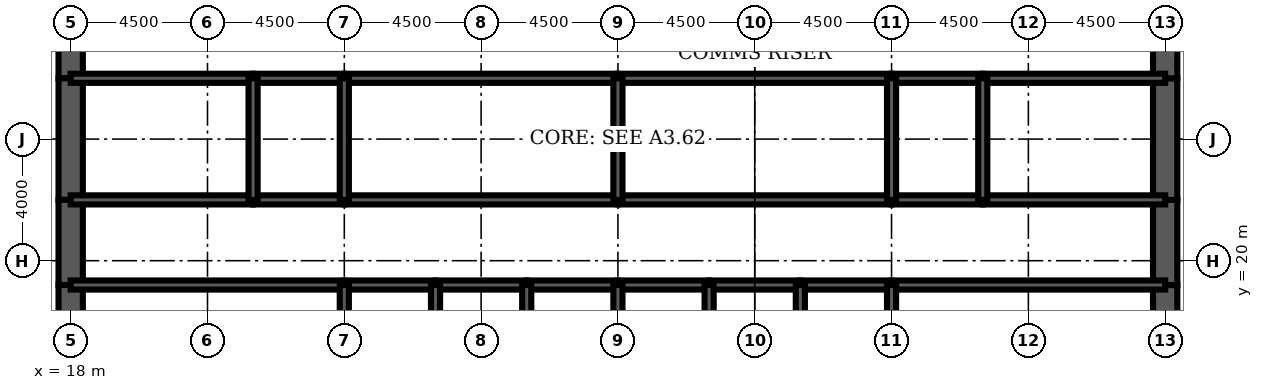
"""IFC4 building model, lengths in metres.
Left out: names, types, materials, properties, quantities, classifications, styles, units other than length and angle.
Written with IfcOpenShell. Run it as: python <this file> out.ifc"""

import sys

from ifc_helpers import new_model, si_unit, direction, frame, frame_2d, origin, place, context, subcontext, project, spatial, rectangle, extrude, element, fill, save


model = new_model("IFC4")
c1 = context("Model", 3, precision=1e-05, world=origin(), true_north=direction((0.0, 1.0)))
c2 = subcontext(c1, "Body", "Model", "MODEL_VIEW")
j1 = project(units=[si_unit("LENGTHUNIT", "METRE"), si_unit("PLANEANGLEUNIT", "RADIAN")], contexts=[c1])
p1 = place(None, origin())
s1 = spatial("IfcSite", under=j1, at=p1, CompositionType="ELEMENT")
p2 = place(p1, origin())
s2 = spatial("IfcBuilding", under=s1, at=p2, CompositionType="ELEMENT")
p3 = place(p2, frame((0.0, 0.0, 265.6)))
s3 = spatial("IfcBuildingStorey", under=s2, at=p3, CompositionType="ELEMENT", Elevation=265.6)
p4 = place(p3, frame((18.0, 28.8, 0.0), z_axis=(0.0, 0.0, 1.0), x_axis=(0.0, -1.0, 0.0)))
e1 = element("IfcWall", 1, at=p4, inside=s3, PredefinedType="SHEAR", context=c2, shape_type="SweptSolid", body=[
    extrude(rectangle(XDim=2.8, YDim=0.8, at=frame_2d((1.4, 0.0))), origin(), (0.0, 0.0, 1.0), 5.5),
])
p5 = place(p4, frame((0.4, 0.0, 0.0)))
e2 = element("IfcOpeningElement", 2, at=p5, cuts=e1, PredefinedType="OPENING", context=c2, shape_type="SweptSolid", body=[
    extrude(rectangle(XDim=1.8, YDim=2.1, at=frame_2d((0.9, 1.05))), frame((0.0, 0.41, 0.0), z_axis=(0.0, -1.0, 0.0), x_axis=(1.0, 0.0, 0.0)), (0.0, 0.0, 1.0), 0.82),
])
p6 = place(p3, frame((18.0, 26.0, 0.0), z_axis=(0.0, 0.0, 1.0), x_axis=(0.0, -1.0, 0.0)))
e3 = element("IfcWall", 3, at=p6, inside=s3, PredefinedType="SHEAR", context=c2, shape_type="SweptSolid", body=[
    extrude(rectangle(XDim=4.0, YDim=0.8, at=frame_2d((2.0, 0.0))), origin(), (0.0, 0.0, 1.0), 5.5),
])
p7 = place(p3, frame((18.0, 22.0, 0.0), z_axis=(0.0, 0.0, 1.0), x_axis=(0.0, -1.0, 0.0)))
e4 = element("IfcWall", 4, at=p7, inside=s3, PredefinedType="SHEAR", context=c2, shape_type="SweptSolid", body=[
    extrude(rectangle(XDim=2.8, YDim=0.8, at=frame_2d((1.4, 0.0))), origin(), (0.0, 0.0, 1.0), 5.5),
])
p8 = place(p7, frame((0.6, 0.0, 0.0)))
e5 = element("IfcOpeningElement", 5, at=p8, cuts=e4, PredefinedType="OPENING", context=c2, shape_type="SweptSolid", body=[
    extrude(rectangle(XDim=1.8, YDim=2.1, at=frame_2d((0.9, 1.05))), frame((0.0, 0.41, 0.0), z_axis=(0.0, -1.0, 0.0), x_axis=(1.0, 0.0, 0.0)), (0.0, 0.0, 1.0), 0.82),
])
for number, where, z_axis, x_axis in (
    (6, (18.0, 19.2, 0.0), (0.0, 0.0, 1.0), (0.0, -1.0, 0.0)),
    (7, (54.0, 16.0, 0.0), (0.0, 0.0, 1.0), (0.0, 1.0, 0.0)),
):
    element("IfcWall", number, at=place(p3, frame(where, z_axis=z_axis, x_axis=x_axis)), inside=s3, PredefinedType="SHEAR", context=c2, shape_type="SweptSolid", body=[
        extrude(rectangle(XDim=3.2, YDim=0.8, at=frame_2d((1.6, 0.0))), origin(), (0.0, 0.0, 1.0), 5.5),
    ])
p9 = place(p3, frame((54.0, 19.2, 0.0), z_axis=(0.0, 0.0, 1.0), x_axis=(0.0, 1.0, 0.0)))
e8 = element("IfcWall", 8, at=p9, inside=s3, PredefinedType="SHEAR", context=c2, shape_type="SweptSolid", body=[
    extrude(rectangle(XDim=2.8, YDim=0.8, at=frame_2d((1.4, 0.0))), origin(), (0.0, 0.0, 1.0), 5.5),
])
p10 = place(p9, frame((0.4, 0.0, 0.0)))
e9 = element("IfcOpeningElement", 9, at=p10, cuts=e8, PredefinedType="OPENING", context=c2, shape_type="SweptSolid", body=[
    extrude(rectangle(XDim=1.8, YDim=2.1, at=frame_2d((0.9, 1.05))), frame((0.0, 0.41, 0.0), z_axis=(0.0, -1.0, 0.0), x_axis=(1.0, 0.0, 0.0)), (0.0, 0.0, 1.0), 0.82),
])
p11 = place(p3, frame((54.0, 22.0, 0.0), z_axis=(0.0, 0.0, 1.0), x_axis=(0.0, 1.0, 0.0)))
e10 = element("IfcWall", 10, at=p11, inside=s3, PredefinedType="SHEAR", context=c2, shape_type="SweptSolid", body=[
    extrude(rectangle(XDim=4.0, YDim=0.8, at=frame_2d((2.0, 0.0))), origin(), (0.0, 0.0, 1.0), 5.5),
])
p12 = place(p3, frame((54.0, 26.0, 0.0), z_axis=(0.0, 0.0, 1.0), x_axis=(0.0, 1.0, 0.0)))
e11 = element("IfcWall", 11, at=p12, inside=s3, PredefinedType="SHEAR", context=c2, shape_type="SweptSolid", body=[
    extrude(rectangle(XDim=2.8, YDim=0.8, at=frame_2d((1.4, 0.0))), origin(), (0.0, 0.0, 1.0), 5.5),
])
p13 = place(p12, frame((0.6, 0.0, 0.0)))
e12 = element("IfcOpeningElement", 12, at=p13, cuts=e11, PredefinedType="OPENING", context=c2, shape_type="SweptSolid", body=[
    extrude(rectangle(XDim=1.8, YDim=2.1, at=frame_2d((0.9, 1.05))), frame((0.0, 0.41, 0.0), z_axis=(0.0, -1.0, 0.0), x_axis=(1.0, 0.0, 0.0)), (0.0, 0.0, 1.0), 0.82),
])
p14 = place(p3, frame((18.0, 19.2, 0.0), z_axis=(0.0, 0.0, 1.0), x_axis=(1.0, 0.0, 0.0)))
e13 = element("IfcWall", 13, at=p14, inside=s3, PredefinedType="SOLIDWALL", context=c2, shape_type="SweptSolid", body=[
    extrude(rectangle(XDim=9.0, YDim=0.3, at=frame_2d((4.5, 0.0))), origin(), (0.0, 0.0, 1.0), 5.5),
])
p15 = place(p14, frame((0.65, 0.0, 0.0)))
e14 = element("IfcOpeningElement", 14, at=p15, cuts=e13, PredefinedType="OPENING", context=c2, shape_type="SweptSolid", body=[
    extrude(rectangle(XDim=1.0, YDim=2.1, at=frame_2d((0.5, 1.05))), frame((0.0, 0.16, 0.0), z_axis=(0.0, -1.0, 0.0), x_axis=(1.0, 0.0, 0.0)), (0.0, 0.0, 1.0), 0.32),
])
p16 = place(p3, frame((27.0, 19.2, 0.0), z_axis=(0.0, 0.0, 1.0), x_axis=(1.0, 0.0, 0.0)))
e15 = element("IfcWall", 15, at=p16, inside=s3, PredefinedType="SOLIDWALL", context=c2, shape_type="SweptSolid", body=[
    extrude(rectangle(XDim=3.0, YDim=0.3, at=frame_2d((1.5, 0.0))), origin(), (0.0, 0.0, 1.0), 5.5),
])
p17 = place(p16, frame((0.95, 0.0, 0.0)))
e16 = element("IfcOpeningElement", 16, at=p17, cuts=e15, PredefinedType="OPENING", context=c2, shape_type="SweptSolid", body=[
    extrude(rectangle(XDim=1.1, YDim=2.2, at=frame_2d((0.55, 1.1))), frame((0.0, 0.16, 0.0), z_axis=(0.0, -1.0, 0.0), x_axis=(1.0, 0.0, 0.0)), (0.0, 0.0, 1.0), 0.32),
])
for number, where, z_axis, x_axis in (
    (17, (30.0, 19.2, 0.0), (0.0, 0.0, 1.0), (1.0, 0.0, 0.0)),
    (18, (33.0, 19.2, 0.0), (0.0, 0.0, 1.0), (1.0, 0.0, 0.0)),
    (19, (36.0, 19.2, 0.0), (0.0, 0.0, 1.0), (1.0, 0.0, 0.0)),
):
    element("IfcWall", number, at=place(p3, frame(where, z_axis=z_axis, x_axis=x_axis)), inside=s3, PredefinedType="SOLIDWALL", context=c2, shape_type="SweptSolid", body=[
        extrude(rectangle(XDim=3.0, YDim=0.3, at=frame_2d((1.5, 0.0))), origin(), (0.0, 0.0, 1.0), 5.5),
    ])
p18 = place(p3, frame((39.0, 19.2, 0.0), z_axis=(0.0, 0.0, 1.0), x_axis=(1.0, 0.0, 0.0)))
e20 = element("IfcWall", 20, at=p18, inside=s3, PredefinedType="SOLIDWALL", context=c2, shape_type="SweptSolid", body=[
    extrude(rectangle(XDim=3.0, YDim=0.3, at=frame_2d((1.5, 0.0))), origin(), (0.0, 0.0, 1.0), 5.5),
])
p19 = place(p18, frame((1.0, 0.0, 0.0)))
e21 = element("IfcOpeningElement", 21, at=p19, cuts=e20, PredefinedType="OPENING", context=c2, shape_type="SweptSolid", body=[
    extrude(rectangle(XDim=1.0, YDim=2.1, at=frame_2d((0.5, 1.05))), frame((0.0, 0.16, 0.0), z_axis=(0.0, -1.0, 0.0), x_axis=(1.0, 0.0, 0.0)), (0.0, 0.0, 1.0), 0.32),
])
p20 = place(p3, frame((42.0, 19.2, 0.0), z_axis=(0.0, 0.0, 1.0), x_axis=(1.0, 0.0, 0.0)))
e22 = element("IfcWall", 22, at=p20, inside=s3, PredefinedType="SOLIDWALL", context=c2, shape_type="SweptSolid", body=[
    extrude(rectangle(XDim=3.0, YDim=0.3, at=frame_2d((1.5, 0.0))), origin(), (0.0, 0.0, 1.0), 5.5),
])
p21 = place(p20, frame((1.0, 0.0, 0.0)))
e23 = element("IfcOpeningElement", 23, at=p21, cuts=e22, PredefinedType="OPENING", context=c2, shape_type="SweptSolid", body=[
    extrude(rectangle(XDim=1.0, YDim=2.1, at=frame_2d((0.5, 1.05))), frame((0.0, 0.16, 0.0), z_axis=(0.0, -1.0, 0.0), x_axis=(1.0, 0.0, 0.0)), (0.0, 0.0, 1.0), 0.32),
])
p22 = place(p3, frame((45.0, 19.2, 0.0), z_axis=(0.0, 0.0, 1.0), x_axis=(1.0, 0.0, 0.0)))
e24 = element("IfcWall", 24, at=p22, inside=s3, PredefinedType="SOLIDWALL", context=c2, shape_type="SweptSolid", body=[
    extrude(rectangle(XDim=9.0, YDim=0.3, at=frame_2d((4.5, 0.0))), origin(), (0.0, 0.0, 1.0), 5.5),
])
p23 = place(p22, frame((7.35, 0.0, 0.0)))
e25 = element("IfcOpeningElement", 25, at=p23, cuts=e24, PredefinedType="OPENING", context=c2, shape_type="SweptSolid", body=[
    extrude(rectangle(XDim=1.0, YDim=2.1, at=frame_2d((0.5, 1.05))), frame((0.0, 0.16, 0.0), z_axis=(0.0, -1.0, 0.0), x_axis=(1.0, 0.0, 0.0)), (0.0, 0.0, 1.0), 0.32),
])
p24 = place(p3, frame((18.0, 22.0, 0.0), z_axis=(0.0, 0.0, 1.0), x_axis=(1.0, 0.0, 0.0)))
e26 = element("IfcWall", 26, at=p24, inside=s3, PredefinedType="SOLIDWALL", context=c2, shape_type="SweptSolid", body=[
    extrude(rectangle(XDim=6.0, YDim=0.3, at=frame_2d((3.0, 0.0))), origin(), (0.0, 0.0, 1.0), 5.5),
])
p25 = place(p24, frame((2.0, 0.0, 0.0)))
e27 = element("IfcOpeningElement", 27, at=p25, cuts=e26, PredefinedType="OPENING", context=c2, shape_type="SweptSolid", body=[
    extrude(rectangle(XDim=1.0, YDim=2.1, at=frame_2d((0.5, 1.05))), frame((0.0, 0.16, 0.0), z_axis=(0.0, -1.0, 0.0), x_axis=(1.0, 0.0, 0.0)), (0.0, 0.0, 1.0), 0.32),
])
p26 = place(p3, frame((24.0, 22.0, 0.0), z_axis=(0.0, 0.0, 1.0), x_axis=(1.0, 0.0, 0.0)))
e28 = element("IfcWall", 28, at=p26, inside=s3, PredefinedType="SOLIDWALL", context=c2, shape_type="SweptSolid", body=[
    extrude(rectangle(XDim=3.0, YDim=0.3, at=frame_2d((1.5, 0.0))), origin(), (0.0, 0.0, 1.0), 5.5),
])
p27 = place(p26, frame((1.0, 0.0, 0.0)))
e29 = element("IfcOpeningElement", 29, at=p27, cuts=e28, PredefinedType="OPENING", context=c2, shape_type="SweptSolid", body=[
    extrude(rectangle(XDim=1.0, YDim=2.1, at=frame_2d((0.5, 1.05))), frame((0.0, 0.16, 0.0), z_axis=(0.0, -1.0, 0.0), x_axis=(1.0, 0.0, 0.0)), (0.0, 0.0, 1.0), 0.32),
])
p28 = place(p3, frame((27.0, 22.0, 0.0), z_axis=(0.0, 0.0, 1.0), x_axis=(1.0, 0.0, 0.0)))
e30 = element("IfcWall", 30, at=p28, inside=s3, PredefinedType="SOLIDWALL", context=c2, shape_type="SweptSolid", body=[
    extrude(rectangle(XDim=9.0, YDim=0.3, at=frame_2d((4.5, 0.0))), origin(), (0.0, 0.0, 1.0), 5.5),
])
p29 = place(p28, frame((4.0, 0.0, 0.0)))
e31 = element("IfcOpeningElement", 31, at=p29, cuts=e30, PredefinedType="OPENING", context=c2, shape_type="SweptSolid", body=[
    extrude(rectangle(XDim=1.0, YDim=2.1, at=frame_2d((0.5, 1.05))), frame((0.0, 0.16, 0.0), z_axis=(0.0, -1.0, 0.0), x_axis=(1.0, 0.0, 0.0)), (0.0, 0.0, 1.0), 0.32),
])
p30 = place(p3, frame((36.0, 22.0, 0.0), z_axis=(0.0, 0.0, 1.0), x_axis=(1.0, 0.0, 0.0)))
e32 = element("IfcWall", 32, at=p30, inside=s3, PredefinedType="SOLIDWALL", context=c2, shape_type="SweptSolid", body=[
    extrude(rectangle(XDim=9.0, YDim=0.3, at=frame_2d((4.5, 0.0))), origin(), (0.0, 0.0, 1.0), 5.5),
])
p31 = place(p30, frame((4.0, 0.0, 0.0)))
e33 = element("IfcOpeningElement", 33, at=p31, cuts=e32, PredefinedType="OPENING", context=c2, shape_type="SweptSolid", body=[
    extrude(rectangle(XDim=1.0, YDim=2.1, at=frame_2d((0.5, 1.05))), frame((0.0, 0.16, 0.0), z_axis=(0.0, -1.0, 0.0), x_axis=(1.0, 0.0, 0.0)), (0.0, 0.0, 1.0), 0.32),
])
p32 = place(p3, frame((45.0, 22.0, 0.0), z_axis=(0.0, 0.0, 1.0), x_axis=(1.0, 0.0, 0.0)))
e34 = element("IfcWall", 34, at=p32, inside=s3, PredefinedType="SOLIDWALL", context=c2, shape_type="SweptSolid", body=[
    extrude(rectangle(XDim=3.0, YDim=0.3, at=frame_2d((1.5, 0.0))), origin(), (0.0, 0.0, 1.0), 5.5),
])
p33 = place(p32, frame((1.0, 0.0, 0.0)))
e35 = element("IfcOpeningElement", 35, at=p33, cuts=e34, PredefinedType="OPENING", context=c2, shape_type="SweptSolid", body=[
    extrude(rectangle(XDim=1.0, YDim=2.1, at=frame_2d((0.5, 1.05))), frame((0.0, 0.16, 0.0), z_axis=(0.0, -1.0, 0.0), x_axis=(1.0, 0.0, 0.0)), (0.0, 0.0, 1.0), 0.32),
])
p34 = place(p3, frame((48.0, 22.0, 0.0), z_axis=(0.0, 0.0, 1.0), x_axis=(1.0, 0.0, 0.0)))
e36 = element("IfcWall", 36, at=p34, inside=s3, PredefinedType="SOLIDWALL", context=c2, shape_type="SweptSolid", body=[
    extrude(rectangle(XDim=6.0, YDim=0.3, at=frame_2d((3.0, 0.0))), origin(), (0.0, 0.0, 1.0), 5.5),
])
p35 = place(p34, frame((2.0, 0.0, 0.0)))
e37 = element("IfcOpeningElement", 37, at=p35, cuts=e36, PredefinedType="OPENING", context=c2, shape_type="SweptSolid", body=[
    extrude(rectangle(XDim=1.0, YDim=2.1, at=frame_2d((0.5, 1.05))), frame((0.0, 0.16, 0.0), z_axis=(0.0, -1.0, 0.0), x_axis=(1.0, 0.0, 0.0)), (0.0, 0.0, 1.0), 0.32),
])
p36 = place(p3, frame((18.0, 26.0, 0.0), z_axis=(0.0, 0.0, 1.0), x_axis=(1.0, 0.0, 0.0)))
e38 = element("IfcWall", 38, at=p36, inside=s3, PredefinedType="SOLIDWALL", context=c2, shape_type="SweptSolid", body=[
    extrude(rectangle(XDim=6.0, YDim=0.3, at=frame_2d((3.0, 0.0))), origin(), (0.0, 0.0, 1.0), 5.5),
])
p37 = place(p3, frame((24.0, 26.0, 0.0), z_axis=(0.0, 0.0, 1.0), x_axis=(1.0, 0.0, 0.0)))
e39 = element("IfcWall", 39, at=p37, inside=s3, PredefinedType="SOLIDWALL", context=c2, shape_type="SweptSolid", body=[
    extrude(rectangle(XDim=3.0, YDim=0.3, at=frame_2d((1.5, 0.0))), origin(), (0.0, 0.0, 1.0), 5.5),
])
for number, where, z_axis, x_axis in (
    (40, (27.0, 26.0, 0.0), (0.0, 0.0, 1.0), (1.0, 0.0, 0.0)),
    (41, (36.0, 26.0, 0.0), (0.0, 0.0, 1.0), (1.0, 0.0, 0.0)),
):
    element("IfcWall", number, at=place(p3, frame(where, z_axis=z_axis, x_axis=x_axis)), inside=s3, PredefinedType="SOLIDWALL", context=c2, shape_type="SweptSolid", body=[
        extrude(rectangle(XDim=9.0, YDim=0.3, at=frame_2d((4.5, 0.0))), origin(), (0.0, 0.0, 1.0), 5.5),
    ])
p38 = place(p3, frame((45.0, 26.0, 0.0), z_axis=(0.0, 0.0, 1.0), x_axis=(1.0, 0.0, 0.0)))
e42 = element("IfcWall", 42, at=p38, inside=s3, PredefinedType="SOLIDWALL", context=c2, shape_type="SweptSolid", body=[
    extrude(rectangle(XDim=3.0, YDim=0.3, at=frame_2d((1.5, 0.0))), origin(), (0.0, 0.0, 1.0), 5.5),
])
p39 = place(p3, frame((48.0, 26.0, 0.0), z_axis=(0.0, 0.0, 1.0), x_axis=(1.0, 0.0, 0.0)))
e43 = element("IfcWall", 43, at=p39, inside=s3, PredefinedType="SOLIDWALL", context=c2, shape_type="SweptSolid", body=[
    extrude(rectangle(XDim=6.0, YDim=0.3, at=frame_2d((3.0, 0.0))), origin(), (0.0, 0.0, 1.0), 5.5),
])
for number, where, z_axis, x_axis in (
    (44, (27.0, 16.0, 0.0), (0.0, 0.0, 1.0), (0.0, 1.0, 0.0)),
    (45, (30.0, 16.0, 0.0), (0.0, 0.0, 1.0), (0.0, 1.0, 0.0)),
    (46, (33.0, 16.0, 0.0), (0.0, 0.0, 1.0), (0.0, 1.0, 0.0)),
    (47, (36.0, 16.0, 0.0), (0.0, 0.0, 1.0), (0.0, 1.0, 0.0)),
    (48, (39.0, 16.0, 0.0), (0.0, 0.0, 1.0), (0.0, 1.0, 0.0)),
    (49, (42.0, 16.0, 0.0), (0.0, 0.0, 1.0), (0.0, 1.0, 0.0)),
    (50, (45.0, 16.0, 0.0), (0.0, 0.0, 1.0), (0.0, 1.0, 0.0)),
):
    element("IfcWall", number, at=place(p3, frame(where, z_axis=z_axis, x_axis=x_axis)), inside=s3, PredefinedType="SOLIDWALL", context=c2, shape_type="SweptSolid", body=[
        extrude(rectangle(XDim=3.2, YDim=0.3, at=frame_2d((1.6, 0.0))), origin(), (0.0, 0.0, 1.0), 5.5),
    ])
for number, where, z_axis, x_axis in (
    (51, (24.0, 22.0, 0.0), (0.0, 0.0, 1.0), (0.0, 1.0, 0.0)),
    (52, (27.0, 22.0, 0.0), (0.0, 0.0, 1.0), (0.0, 1.0, 0.0)),
    (53, (36.0, 22.0, 0.0), (0.0, 0.0, 1.0), (0.0, 1.0, 0.0)),
    (54, (45.0, 22.0, 0.0), (0.0, 0.0, 1.0), (0.0, 1.0, 0.0)),
    (55, (48.0, 22.0, 0.0), (0.0, 0.0, 1.0), (0.0, 1.0, 0.0)),
):
    element("IfcWall", number, at=place(p3, frame(where, z_axis=z_axis, x_axis=x_axis)), inside=s3, PredefinedType="SOLIDWALL", context=c2, shape_type="SweptSolid", body=[
        extrude(rectangle(XDim=4.0, YDim=0.3, at=frame_2d((2.0, 0.0))), origin(), (0.0, 0.0, 1.0), 5.5),
    ])
p40 = place(p3, frame((39.0, 22.15, 0.0), z_axis=(0.0, 0.0, 1.0), x_axis=(0.0, 1.0, 0.0)))
e56 = element("IfcWall", 56, at=p40, inside=s3, PredefinedType="PARTITIONING", context=c2, shape_type="SweptSolid", body=[
    extrude(rectangle(XDim=3.7, YDim=0.15, at=frame_2d((1.85, 0.0))), origin(), (0.0, 0.0, 1.0), 3.0),
])
p41 = place(p40, frame((2.2, 0.0, 0.0)))
e57 = element("IfcOpeningElement", 57, at=p41, cuts=e56, PredefinedType="OPENING", context=c2, shape_type="SweptSolid", body=[
    extrude(rectangle(XDim=1.0, YDim=2.1, at=frame_2d((0.5, 1.05))), frame((0.0, 0.085, 0.0), z_axis=(0.0, -1.0, 0.0), x_axis=(1.0, 0.0, 0.0)), (0.0, 0.0, 1.0), 0.17),
])
p42 = place(p41, origin())
e58 = element("IfcDoor", 58, at=p42, inside=s3, OperationType="SINGLE_SWING_RIGHT", PredefinedType="DOOR", context=c2, shape_type="SweptSolid", body=[
    extrude(rectangle(XDim=1.0, YDim=2.1, at=frame_2d((0.5, 1.05))), frame((0.0, 0.025, 0.0), z_axis=(0.0, -1.0, 0.0), x_axis=(1.0, 0.0, 0.0)), (0.0, 0.0, 1.0), 0.05),
])
fill(e57, e58)
p43 = place(p17, origin())
e59 = element("IfcDoor", 59, at=p43, inside=s3, OperationType="DOUBLE_DOOR_SLIDING", PredefinedType="USERDEFINED", context=c2, shape_type="SweptSolid", body=[
    extrude(rectangle(XDim=1.1, YDim=2.2, at=frame_2d((0.55, 1.1))), frame((0.0, 0.025, 0.0), z_axis=(0.0, -1.0, 0.0), x_axis=(1.0, 0.0, 0.0)), (0.0, 0.0, 1.0), 0.05),
])
fill(e16, e59)
p44 = place(p15, origin())
e60 = element("IfcDoor", 60, at=p44, inside=s3, OperationType="SINGLE_SWING_LEFT", PredefinedType="DOOR", context=c2, shape_type="SweptSolid", body=[
    extrude(rectangle(XDim=1.0, YDim=2.1, at=frame_2d((0.5, 1.05))), frame((0.0, 0.025, 0.0), z_axis=(0.0, -1.0, 0.0), x_axis=(1.0, 0.0, 0.0)), (0.0, 0.0, 1.0), 0.05),
])
fill(e14, e60)
p45 = place(p23, origin())
e61 = element("IfcDoor", 61, at=p45, inside=s3, OperationType="SINGLE_SWING_RIGHT", PredefinedType="DOOR", context=c2, shape_type="SweptSolid", body=[
    extrude(rectangle(XDim=1.0, YDim=2.1, at=frame_2d((0.5, 1.05))), frame((0.0, 0.025, 0.0), z_axis=(0.0, -1.0, 0.0), x_axis=(1.0, 0.0, 0.0)), (0.0, 0.0, 1.0), 0.05),
])
fill(e25, e61)
p46 = place(p8, origin())
e62 = element("IfcDoor", 62, at=p46, inside=s3, OperationType="SINGLE_SWING_LEFT", PredefinedType="DOOR", context=c2, shape_type="SweptSolid", body=[
    extrude(rectangle(XDim=1.8, YDim=2.1, at=frame_2d((0.9, 1.05))), frame((0.0, 0.4, 0.0), z_axis=(0.0, -1.0, 0.0), x_axis=(1.0, 0.0, 0.0)), (0.0, 0.0, 1.0), 0.8),
])
fill(e5, e62)
p47 = place(p5, origin())
e63 = element("IfcDoor", 63, at=p47, inside=s3, OperationType="SINGLE_SWING_LEFT", PredefinedType="DOOR", context=c2, shape_type="SweptSolid", body=[
    extrude(rectangle(XDim=1.8, YDim=2.1, at=frame_2d((0.9, 1.05))), frame((0.0, 0.4, 0.0), z_axis=(0.0, -1.0, 0.0), x_axis=(1.0, 0.0, 0.0)), (0.0, 0.0, 1.0), 0.8),
])
fill(e2, e63)
p48 = place(p10, origin())
e64 = element("IfcDoor", 64, at=p48, inside=s3, OperationType="SINGLE_SWING_LEFT", PredefinedType="DOOR", context=c2, shape_type="SweptSolid", body=[
    extrude(rectangle(XDim=1.8, YDim=2.1, at=frame_2d((0.9, 1.05))), frame((0.0, 0.4, 0.0), z_axis=(0.0, -1.0, 0.0), x_axis=(1.0, 0.0, 0.0)), (0.0, 0.0, 1.0), 0.8),
])
fill(e9, e64)
p49 = place(p13, origin())
e65 = element("IfcDoor", 65, at=p49, inside=s3, OperationType="SINGLE_SWING_LEFT", PredefinedType="DOOR", context=c2, shape_type="SweptSolid", body=[
    extrude(rectangle(XDim=1.8, YDim=2.1, at=frame_2d((0.9, 1.05))), frame((0.0, 0.4, 0.0), z_axis=(0.0, -1.0, 0.0), x_axis=(1.0, 0.0, 0.0)), (0.0, 0.0, 1.0), 0.8),
])
fill(e12, e65)
p50 = place(p25, origin())
e66 = element("IfcDoor", 66, at=p50, inside=s3, OperationType="SINGLE_SWING_LEFT", PredefinedType="DOOR", context=c2, shape_type="SweptSolid", body=[
    extrude(rectangle(XDim=1.0, YDim=2.1, at=frame_2d((0.5, 1.05))), frame((0.0, 0.025, 0.0), z_axis=(0.0, -1.0, 0.0), x_axis=(1.0, 0.0, 0.0)), (0.0, 0.0, 1.0), 0.05),
])
fill(e27, e66)
p51 = place(p27, origin())
e67 = element("IfcDoor", 67, at=p51, inside=s3, OperationType="SINGLE_SWING_LEFT", PredefinedType="DOOR", context=c2, shape_type="SweptSolid", body=[
    extrude(rectangle(XDim=1.0, YDim=2.1, at=frame_2d((0.5, 1.05))), frame((0.0, 0.025, 0.0), z_axis=(0.0, -1.0, 0.0), x_axis=(1.0, 0.0, 0.0)), (0.0, 0.0, 1.0), 0.05),
])
fill(e29, e67)
p52 = place(p29, origin())
e68 = element("IfcDoor", 68, at=p52, inside=s3, OperationType="SINGLE_SWING_LEFT", PredefinedType="DOOR", context=c2, shape_type="SweptSolid", body=[
    extrude(rectangle(XDim=1.0, YDim=2.1, at=frame_2d((0.5, 1.05))), frame((0.0, 0.025, 0.0), z_axis=(0.0, -1.0, 0.0), x_axis=(1.0, 0.0, 0.0)), (0.0, 0.0, 1.0), 0.05),
])
fill(e31, e68)
p53 = place(p31, origin())
e69 = element("IfcDoor", 69, at=p53, inside=s3, OperationType="SINGLE_SWING_LEFT", PredefinedType="DOOR", context=c2, shape_type="SweptSolid", body=[
    extrude(rectangle(XDim=1.0, YDim=2.1, at=frame_2d((0.5, 1.05))), frame((0.0, 0.025, 0.0), z_axis=(0.0, -1.0, 0.0), x_axis=(1.0, 0.0, 0.0)), (0.0, 0.0, 1.0), 0.05),
])
fill(e33, e69)
p54 = place(p33, origin())
e70 = element("IfcDoor", 70, at=p54, inside=s3, OperationType="SINGLE_SWING_LEFT", PredefinedType="DOOR", context=c2, shape_type="SweptSolid", body=[
    extrude(rectangle(XDim=1.0, YDim=2.1, at=frame_2d((0.5, 1.05))), frame((0.0, 0.025, 0.0), z_axis=(0.0, -1.0, 0.0), x_axis=(1.0, 0.0, 0.0)), (0.0, 0.0, 1.0), 0.05),
])
fill(e35, e70)
p55 = place(p35, origin())
e71 = element("IfcDoor", 71, at=p55, inside=s3, OperationType="SINGLE_SWING_LEFT", PredefinedType="DOOR", context=c2, shape_type="SweptSolid", body=[
    extrude(rectangle(XDim=1.0, YDim=2.1, at=frame_2d((0.5, 1.05))), frame((0.0, 0.025, 0.0), z_axis=(0.0, -1.0, 0.0), x_axis=(1.0, 0.0, 0.0)), (0.0, 0.0, 1.0), 0.05),
])
fill(e37, e71)
p56 = place(p19, origin())
e72 = element("IfcDoor", 72, at=p56, inside=s3, OperationType="SINGLE_SWING_LEFT", PredefinedType="DOOR", context=c2, shape_type="SweptSolid", body=[
    extrude(rectangle(XDim=1.0, YDim=2.1, at=frame_2d((0.5, 1.05))), frame((0.0, 0.025, 0.0), z_axis=(0.0, -1.0, 0.0), x_axis=(1.0, 0.0, 0.0)), (0.0, 0.0, 1.0), 0.05),
])
fill(e21, e72)
p57 = place(p21, origin())
e73 = element("IfcDoor", 73, at=p57, inside=s3, OperationType="SINGLE_SWING_LEFT", PredefinedType="DOOR", context=c2, shape_type="SweptSolid", body=[
    extrude(rectangle(XDim=1.0, YDim=2.1, at=frame_2d((0.5, 1.05))), frame((0.0, 0.025, 0.0), z_axis=(0.0, -1.0, 0.0), x_axis=(1.0, 0.0, 0.0)), (0.0, 0.0, 1.0), 0.05),
])
fill(e23, e73)
save(model, sys.argv[1])
